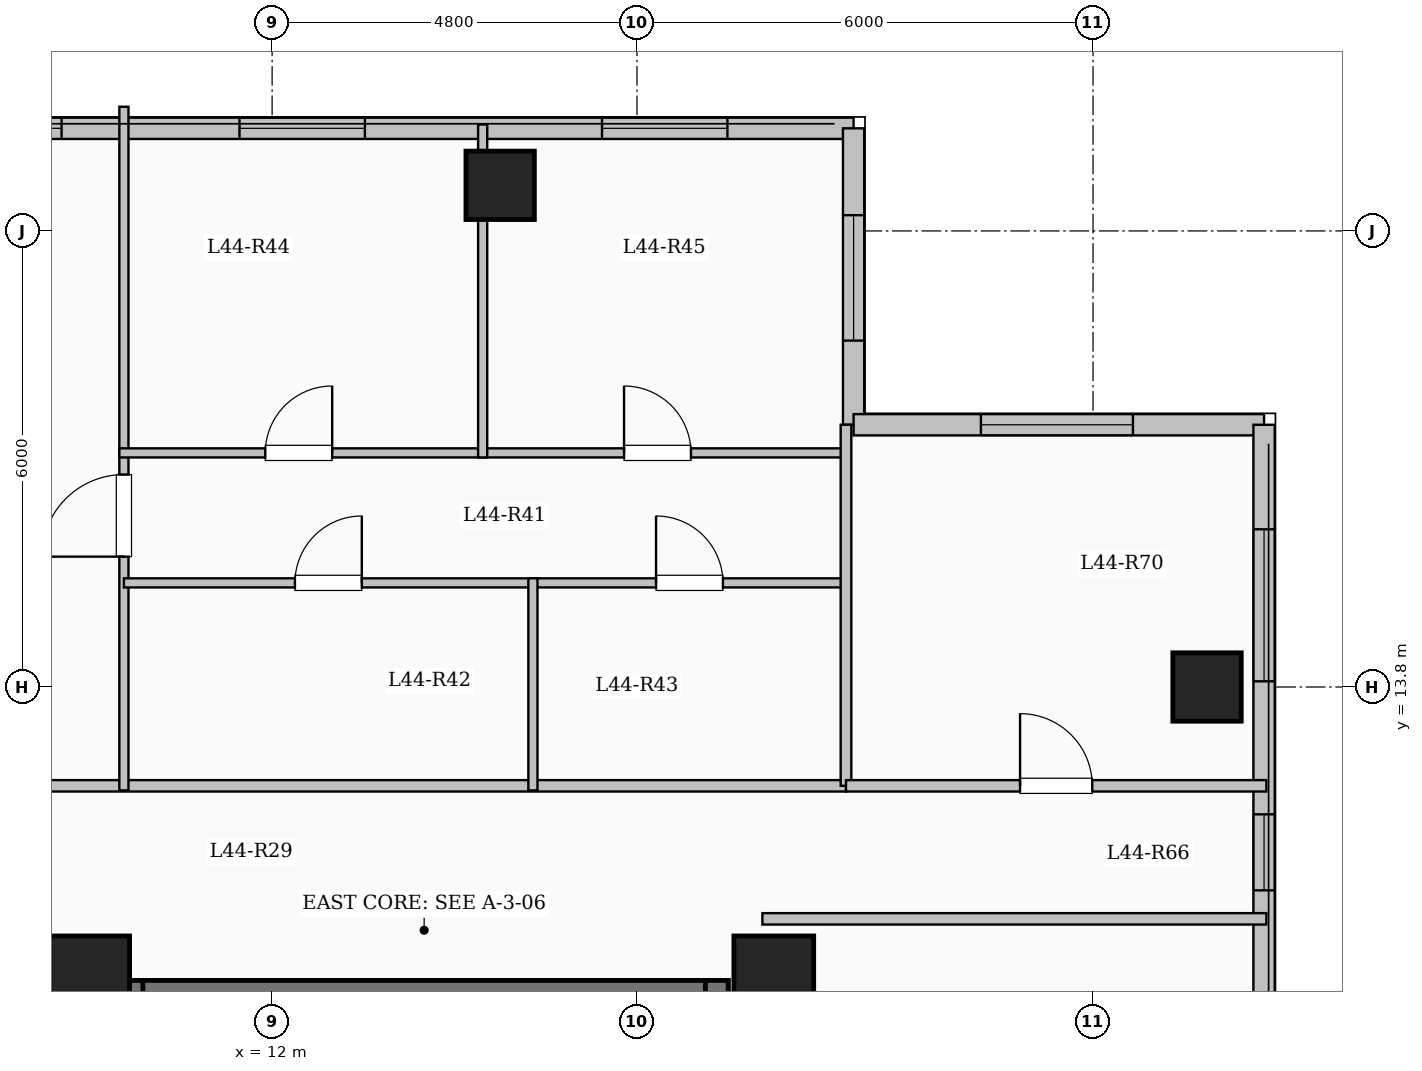
"""IFC4 building model, lengths in metres.
Left out: names, types, materials, properties, quantities, classifications, styles, units other than length and angle.
Written with IfcOpenShell. Run it as: python <this file> out.ifc"""

import sys

from ifc_helpers import new_model, si_unit, direction, frame, frame_2d, origin, origin_2d, place, context, subcontext, project, spatial, rectangle, extrude, element, fill, save


model = new_model("IFC4")
c1 = context("Model", 3, precision=1e-05, world=origin(), true_north=direction((0.0, 1.0)))
c2 = subcontext(c1, "Body", "Model", "MODEL_VIEW")
j1 = project(units=[si_unit("LENGTHUNIT", "METRE"), si_unit("PLANEANGLEUNIT", "RADIAN")], contexts=[c1])
p1 = place(None, origin())
s1 = spatial("IfcSite", under=j1, at=p1, CompositionType="ELEMENT")
p2 = place(p1, origin())
s2 = spatial("IfcBuilding", under=s1, at=p2, CompositionType="ELEMENT")
p3 = place(p2, frame((0.0, 0.0, 162.75)))
s3 = spatial("IfcBuildingStorey", under=s2, at=p3, CompositionType="ELEMENT", Elevation=162.75)
for number, where, z_axis, x_axis in (
    (1, (9.6, 10.0, 0.0), (0.0, 0.0, 1.0), (1.0, 0.0, 0.0)),
    (2, (18.6, 10.0, 0.0), (0.0, 0.0, 1.0), (1.0, 0.0, 0.0)),
):
    element("IfcColumn", number, at=place(p3, frame(where, z_axis=z_axis, x_axis=x_axis)), inside=s3, PredefinedType="COLUMN", context=c2, shape_type="SweptSolid", body=[
        extrude(rectangle(XDim=1.05, YDim=1.05, at=origin_2d()), origin(), (0.0, 0.0, 1.0), 3.35),
    ])
for number, where, z_axis, x_axis in (
    (3, (15.0, 20.4, 0.0), (0.0, 0.0, 1.0), (1.0, 0.0, 0.0)),
    (4, (24.3, 13.8, 0.0), (0.0, 0.0, 1.0), (1.0, 0.0, 0.0)),
):
    element("IfcColumn", number, at=place(p3, frame(where, z_axis=z_axis, x_axis=x_axis)), inside=s3, PredefinedType="COLUMN", context=c2, shape_type="SweptSolid", body=[
        extrude(rectangle(XDim=0.9, YDim=0.9, at=origin_2d()), origin(), (0.0, 0.0, 1.0), 3.35),
    ])
p4 = place(p3, frame((7.35, 21.15, 0.0), z_axis=(0.0, 0.0, 1.0), x_axis=(1.0, 0.0, 0.0)))
e5 = element("IfcWall", 5, at=p4, inside=s3, PredefinedType="SOLIDWALL", context=c2, shape_type="SweptSolid", body=[
    extrude(rectangle(XDim=12.3, YDim=0.28, at=frame_2d((6.15, 0.0))), origin(), (0.0, 0.0, 1.0), 3.1),
])
p5 = place(p4, frame((0.68, 0.0, 0.95)))
e6 = element("IfcOpeningElement", 6, at=p5, cuts=e5, PredefinedType="OPENING", context=c2, shape_type="SweptSolid", body=[
    extrude(rectangle(XDim=1.2, YDim=1.5, at=frame_2d((0.6, 0.75))), frame((0.0, 0.15, 0.0), z_axis=(0.0, -1.0, 0.0), x_axis=(1.0, 0.0, 0.0)), (0.0, 0.0, 1.0), 0.3),
])
p6 = place(p4, frame((4.22, 0.0, 0.9)))
e7 = element("IfcOpeningElement", 7, at=p6, cuts=e5, PredefinedType="OPENING", context=c2, shape_type="SweptSolid", body=[
    extrude(rectangle(XDim=1.65, YDim=1.6, at=frame_2d((0.825, 0.8))), frame((0.0, 0.15, 0.0), z_axis=(0.0, -1.0, 0.0), x_axis=(1.0, 0.0, 0.0)), (0.0, 0.0, 1.0), 0.3),
])
p7 = place(p4, frame((8.99, 0.0, 0.9)))
e8 = element("IfcOpeningElement", 8, at=p7, cuts=e5, PredefinedType="OPENING", context=c2, shape_type="SweptSolid", body=[
    extrude(rectangle(XDim=1.65, YDim=1.6, at=frame_2d((0.825, 0.8))), frame((0.0, 0.15, 0.0), z_axis=(0.0, -1.0, 0.0), x_axis=(1.0, 0.0, 0.0)), (0.0, 0.0, 1.0), 0.3),
])
p8 = place(p3, frame((19.65, 21.15, 0.0), z_axis=(0.0, 0.0, 1.0), x_axis=(0.0, -1.0, 0.0)))
e9 = element("IfcWall", 9, at=p8, inside=s3, PredefinedType="SOLIDWALL", context=c2, shape_type="SweptSolid", body=[
    extrude(rectangle(XDim=3.9, YDim=0.28, at=frame_2d((1.95, 0.0))), origin(), (0.0, 0.0, 1.0), 3.1),
])
p9 = place(p8, frame((1.143, 0.0, 0.9)))
e10 = element("IfcOpeningElement", 10, at=p9, cuts=e9, PredefinedType="OPENING", context=c2, shape_type="SweptSolid", body=[
    extrude(rectangle(XDim=1.65, YDim=1.6, at=frame_2d((0.825, 0.8))), frame((0.0, 0.15, 0.0), z_axis=(0.0, -1.0, 0.0), x_axis=(1.0, 0.0, 0.0)), (0.0, 0.0, 1.0), 0.3),
])
p10 = place(p3, frame((19.65, 17.25, 0.0), z_axis=(0.0, 0.0, 1.0), x_axis=(1.0, 0.0, 0.0)))
e11 = element("IfcWall", 11, at=p10, inside=s3, PredefinedType="SOLIDWALL", context=c2, shape_type="SweptSolid", body=[
    extrude(rectangle(XDim=5.4, YDim=0.28, at=frame_2d((2.7, 0.0))), origin(), (0.0, 0.0, 1.0), 3.1),
])
p11 = place(p10, frame((1.675, 0.0, 0.9)))
e12 = element("IfcOpeningElement", 12, at=p11, cuts=e11, PredefinedType="OPENING", context=c2, shape_type="SweptSolid", body=[
    extrude(rectangle(XDim=2.0, YDim=1.7, at=frame_2d((1.0, 0.85))), frame((0.0, 0.15, 0.0), z_axis=(0.0, -1.0, 0.0), x_axis=(1.0, 0.0, 0.0)), (0.0, 0.0, 1.0), 0.3),
])
p12 = place(p3, frame((25.05, 17.25, 0.0), z_axis=(0.0, 0.0, 1.0), x_axis=(0.0, -1.0, 0.0)))
e13 = element("IfcWall", 13, at=p12, inside=s3, PredefinedType="SOLIDWALL", context=c2, shape_type="SweptSolid", body=[
    extrude(rectangle(XDim=34.5, YDim=0.28, at=frame_2d((17.25, 0.0))), origin(), (0.0, 0.0, 1.0), 3.1),
])
p13 = place(p12, frame((1.375, 0.0, 0.9)))
e14 = element("IfcOpeningElement", 14, at=p13, cuts=e13, PredefinedType="OPENING", context=c2, shape_type="SweptSolid", body=[
    extrude(rectangle(XDim=2.0, YDim=1.7, at=frame_2d((1.0, 0.85))), frame((0.0, 0.15, 0.0), z_axis=(0.0, -1.0, 0.0), x_axis=(1.0, 0.0, 0.0)), (0.0, 0.0, 1.0), 0.3),
])
p14 = place(p12, frame((5.125, 0.0, 0.95)))
e15 = element("IfcOpeningElement", 15, at=p14, cuts=e13, PredefinedType="OPENING", context=c2, shape_type="SweptSolid", body=[
    extrude(rectangle(XDim=1.0, YDim=1.5, at=frame_2d((0.5, 0.75))), frame((0.0, 0.15, 0.0), z_axis=(0.0, -1.0, 0.0), x_axis=(1.0, 0.0, 0.0)), (0.0, 0.0, 1.0), 0.3),
])
p15 = place(p12, frame((14.5, 0.0, 0.9)))
e16 = element("IfcOpeningElement", 16, at=p15, cuts=e13, PredefinedType="OPENING", context=c2, shape_type="SweptSolid", body=[
    extrude(rectangle(XDim=2.0, YDim=1.7, at=frame_2d((1.0, 0.85))), frame((0.0, 0.15, 0.0), z_axis=(0.0, -1.0, 0.0), x_axis=(1.0, 0.0, 0.0)), (0.0, 0.0, 1.0), 0.3),
])
p16 = place(p12, frame((25.258, 0.0, 0.9)))
e17 = element("IfcOpeningElement", 17, at=p16, cuts=e13, PredefinedType="OPENING", context=c2, shape_type="SweptSolid", body=[
    extrude(rectangle(XDim=1.5, YDim=1.65, at=frame_2d((0.75, 0.825))), frame((0.0, 0.15, 0.0), z_axis=(0.0, -1.0, 0.0), x_axis=(1.0, 0.0, 0.0)), (0.0, 0.0, 1.0), 0.3),
])
p17 = place(p12, frame((29.95, 0.0, 0.9)))
e18 = element("IfcOpeningElement", 18, at=p17, cuts=e13, PredefinedType="OPENING", context=c2, shape_type="SweptSolid", body=[
    extrude(rectangle(XDim=2.2, YDim=1.75, at=frame_2d((1.1, 0.875))), frame((0.0, 0.15, 0.0), z_axis=(0.0, -1.0, 0.0), x_axis=(1.0, 0.0, 0.0)), (0.0, 0.0, 1.0), 0.3),
])
p18 = place(p3, frame((10.0, 9.79, 0.0), z_axis=(0.0, 0.0, 1.0), x_axis=(1.0, 0.0, 0.0)))
e19 = element("IfcWall", 19, at=p18, inside=s3, PredefinedType="SHEAR", context=c2, shape_type="SweptSolid", body=[
    extrude(rectangle(XDim=8.0, YDim=0.3, at=frame_2d((4.0, 0.0))), origin(), (0.0, 0.0, 1.0), 3.35),
])
for number, where, z_axis, x_axis in (
    (20, (10.15, 6.35, 0.0), (0.0, 0.0, 1.0), (0.0, 1.0, 0.0)),
    (21, (17.85, 6.35, 0.0), (0.0, 0.0, 1.0), (0.0, 1.0, 0.0)),
):
    element("IfcWall", number, at=place(p3, frame(where, z_axis=z_axis, x_axis=x_axis)), inside=s3, PredefinedType="SHEAR", context=c2, shape_type="SweptSolid", body=[
        extrude(rectangle(XDim=3.59, YDim=0.3, at=frame_2d((1.795, 0.0))), origin(), (0.0, 0.0, 1.0), 3.35),
    ])
p19 = place(p3, frame((3.85, 12.5, 0.0), z_axis=(0.0, 0.0, 1.0), x_axis=(1.0, 0.0, 0.0)))
e22 = element("IfcWall", 22, at=p19, inside=s3, PredefinedType="PARTITIONING", context=c2, shape_type="SweptSolid", body=[
    extrude(rectangle(XDim=15.7, YDim=0.15, at=frame_2d((7.85, 0.0))), origin(), (0.0, 0.0, 1.0), 3.1),
])
p20 = place(p19, frame((0.7, 0.0, 0.0)))
e23 = element("IfcOpeningElement", 23, at=p20, cuts=e22, PredefinedType="OPENING", context=c2, shape_type="SweptSolid", body=[
    extrude(rectangle(XDim=0.96, YDim=2.15, at=frame_2d((0.48, 1.075))), frame((0.0, 0.085, 0.0), z_axis=(0.0, -1.0, 0.0), x_axis=(1.0, 0.0, 0.0)), (0.0, 0.0, 1.0), 0.17),
])
p21 = place(p3, frame((10.05, 12.44, 0.0), z_axis=(0.0, 0.0, 1.0), x_axis=(0.0, 1.0, 0.0)))
e24 = element("IfcWall", 24, at=p21, inside=s3, PredefinedType="PARTITIONING", context=c2, shape_type="SweptSolid", body=[
    extrude(rectangle(XDim=8.994, YDim=0.12, at=frame_2d((4.497, 0.0))), origin(), (0.0, 0.0, 1.0), 3.1),
])
p22 = place(p21, frame((3.075, 0.0, 0.0)))
e25 = element("IfcOpeningElement", 25, at=p22, cuts=e24, PredefinedType="OPENING", context=c2, shape_type="SweptSolid", body=[
    extrude(rectangle(XDim=1.08, YDim=2.15, at=frame_2d((0.54, 1.075))), frame((0.0, 0.07, 0.0), z_axis=(0.0, -1.0, 0.0), x_axis=(1.0, 0.0, 0.0)), (0.0, 0.0, 1.0), 0.14),
])
p23 = place(p3, frame((10.05, 15.17, 0.0), z_axis=(0.0, 0.0, 1.0), x_axis=(1.0, 0.0, 0.0)))
e26 = element("IfcWall", 26, at=p23, inside=s3, PredefinedType="PARTITIONING", context=c2, shape_type="SweptSolid", body=[
    extrude(rectangle(XDim=5.381, YDim=0.12, at=frame_2d((2.69, 0.0))), origin(), (0.0, 0.0, 1.0), 3.1),
])
p24 = place(p23, frame((2.25, 0.0, 0.0)))
e27 = element("IfcOpeningElement", 27, at=p24, cuts=e26, PredefinedType="OPENING", context=c2, shape_type="SweptSolid", body=[
    extrude(rectangle(XDim=0.88, YDim=2.1, at=frame_2d((0.44, 1.05))), frame((0.0, 0.07, 0.0), z_axis=(0.0, -1.0, 0.0), x_axis=(1.0, 0.0, 0.0)), (0.0, 0.0, 1.0), 0.14),
])
p25 = place(p3, frame((15.431, 15.17, 0.0), z_axis=(0.0, 0.0, 1.0), x_axis=(1.0, 0.0, 0.0)))
e28 = element("IfcWall", 28, at=p25, inside=s3, PredefinedType="PARTITIONING", context=c2, shape_type="SweptSolid", body=[
    extrude(rectangle(XDim=4.119, YDim=0.12, at=frame_2d((2.06, 0.0))), origin(), (0.0, 0.0, 1.0), 3.1),
])
p26 = place(p25, frame((1.62, 0.0, 0.0)))
e29 = element("IfcOpeningElement", 29, at=p26, cuts=e28, PredefinedType="OPENING", context=c2, shape_type="SweptSolid", body=[
    extrude(rectangle(XDim=0.88, YDim=2.1, at=frame_2d((0.44, 1.05))), frame((0.0, 0.07, 0.0), z_axis=(0.0, -1.0, 0.0), x_axis=(1.0, 0.0, 0.0)), (0.0, 0.0, 1.0), 0.14),
])
p27 = place(p3, frame((9.99, 16.88, 0.0), z_axis=(0.0, 0.0, 1.0), x_axis=(1.0, 0.0, 0.0)))
e30 = element("IfcWall", 30, at=p27, inside=s3, PredefinedType="PARTITIONING", context=c2, shape_type="SweptSolid", body=[
    extrude(rectangle(XDim=9.62, YDim=0.12, at=frame_2d((4.81, 0.0))), origin(), (0.0, 0.0, 1.0), 2.685),
])
p28 = place(p27, frame((1.92, 0.0, 0.0)))
e31 = element("IfcOpeningElement", 31, at=p28, cuts=e30, PredefinedType="OPENING", context=c2, shape_type="SweptSolid", body=[
    extrude(rectangle(XDim=0.88, YDim=2.1, at=frame_2d((0.44, 1.05))), frame((0.0, 0.07, 0.0), z_axis=(0.0, -1.0, 0.0), x_axis=(1.0, 0.0, 0.0)), (0.0, 0.0, 1.0), 0.14),
])
p29 = place(p27, frame((6.64, 0.0, 0.0)))
e32 = element("IfcOpeningElement", 32, at=p29, cuts=e30, PredefinedType="OPENING", context=c2, shape_type="SweptSolid", body=[
    extrude(rectangle(XDim=0.88, YDim=2.1, at=frame_2d((0.44, 1.05))), frame((0.0, 0.07, 0.0), z_axis=(0.0, -1.0, 0.0), x_axis=(1.0, 0.0, 0.0)), (0.0, 0.0, 1.0), 0.14),
])
p30 = place(p3, frame((15.431, 12.44, 0.0), z_axis=(0.0, 0.0, 1.0), x_axis=(0.0, 1.0, 0.0)))
e33 = element("IfcWall", 33, at=p30, inside=s3, PredefinedType="PARTITIONING", context=c2, shape_type="SweptSolid", body=[
    extrude(rectangle(XDim=2.79, YDim=0.12, at=frame_2d((1.395, 0.0))), origin(), (0.0, 0.0, 1.0), 3.1),
])
p31 = place(p3, frame((14.77, 16.82, 0.0), z_axis=(0.0, 0.0, 1.0), x_axis=(0.0, 1.0, 0.0)))
e34 = element("IfcWall", 34, at=p31, inside=s3, PredefinedType="PARTITIONING", context=c2, shape_type="SweptSolid", body=[
    extrude(rectangle(XDim=4.38, YDim=0.12, at=frame_2d((2.19, 0.0))), origin(), (0.0, 0.0, 1.0), 2.585),
])
p32 = place(p3, frame((18.45, 10.75, 0.0), z_axis=(0.0, 0.0, 1.0), x_axis=(1.0, 0.0, 0.0)))
e35 = element("IfcWall", 35, at=p32, inside=s3, PredefinedType="PARTITIONING", context=c2, shape_type="SweptSolid", body=[
    extrude(rectangle(XDim=6.63, YDim=0.15, at=frame_2d((3.315, 0.0))), origin(), (0.0, 0.0, 1.0), 3.1),
])
p33 = place(p3, frame((19.55, 12.5, 0.0), z_axis=(0.0, 0.0, 1.0), x_axis=(0.0, 1.0, 0.0)))
e36 = element("IfcWall", 36, at=p33, inside=s3, PredefinedType="PARTITIONING", context=c2, shape_type="SweptSolid", body=[
    extrude(rectangle(XDim=4.75, YDim=0.14, at=frame_2d((2.375, 0.0))), origin(), (0.0, 0.0, 1.0), 3.1),
])
p34 = place(p3, frame((19.55, 12.5, 0.0), z_axis=(0.0, 0.0, 1.0), x_axis=(1.0, 0.0, 0.0)))
e37 = element("IfcWall", 37, at=p34, inside=s3, PredefinedType="PARTITIONING", context=c2, shape_type="SweptSolid", body=[
    extrude(rectangle(XDim=5.53, YDim=0.15, at=frame_2d((2.765, 0.0))), origin(), (0.0, 0.0, 1.0), 3.1),
])
p35 = place(p34, frame((2.29, 0.0, 0.0)))
e38 = element("IfcOpeningElement", 38, at=p35, cuts=e37, PredefinedType="OPENING", context=c2, shape_type="SweptSolid", body=[
    extrude(rectangle(XDim=0.95, YDim=2.15, at=frame_2d((0.475, 1.075))), frame((0.0, 0.085, 0.0), z_axis=(0.0, -1.0, 0.0), x_axis=(1.0, 0.0, 0.0)), (0.0, 0.0, 1.0), 0.17),
])
p36 = place(p5, origin())
e39 = element("IfcWindow", 39, at=p36, inside=s3, PartitioningType="SINGLE_PANEL", PredefinedType="WINDOW", context=c2, shape_type="SweptSolid", body=[
    extrude(rectangle(XDim=1.2, YDim=1.5, at=frame_2d((0.6, 0.75))), frame((0.0, 0.03, 0.0), z_axis=(0.0, -1.0, 0.0), x_axis=(1.0, 0.0, 0.0)), (0.0, 0.0, 1.0), 0.06),
])
fill(e6, e39)
p37 = place(p6, origin())
e40 = element("IfcWindow", 40, at=p37, inside=s3, PartitioningType="SINGLE_PANEL", PredefinedType="WINDOW", context=c2, shape_type="SweptSolid", body=[
    extrude(rectangle(XDim=1.65, YDim=1.6, at=frame_2d((0.825, 0.8))), frame((0.0, 0.03, 0.0), z_axis=(0.0, -1.0, 0.0), x_axis=(1.0, 0.0, 0.0)), (0.0, 0.0, 1.0), 0.06),
])
fill(e7, e40)
p38 = place(p7, origin())
e41 = element("IfcWindow", 41, at=p38, inside=s3, PartitioningType="SINGLE_PANEL", PredefinedType="WINDOW", context=c2, shape_type="SweptSolid", body=[
    extrude(rectangle(XDim=1.65, YDim=1.6, at=frame_2d((0.825, 0.8))), frame((0.0, 0.03, 0.0), z_axis=(0.0, -1.0, 0.0), x_axis=(1.0, 0.0, 0.0)), (0.0, 0.0, 1.0), 0.06),
])
fill(e8, e41)
p39 = place(p9, origin())
e42 = element("IfcWindow", 42, at=p39, inside=s3, PartitioningType="SINGLE_PANEL", PredefinedType="WINDOW", context=c2, shape_type="SweptSolid", body=[
    extrude(rectangle(XDim=1.65, YDim=1.6, at=frame_2d((0.825, 0.8))), frame((0.0, 0.03, 0.0), z_axis=(0.0, -1.0, 0.0), x_axis=(1.0, 0.0, 0.0)), (0.0, 0.0, 1.0), 0.06),
])
fill(e10, e42)
p40 = place(p11, origin())
e43 = element("IfcWindow", 43, at=p40, inside=s3, PartitioningType="SINGLE_PANEL", PredefinedType="WINDOW", context=c2, shape_type="SweptSolid", body=[
    extrude(rectangle(XDim=2.0, YDim=1.7, at=frame_2d((1.0, 0.85))), frame((0.0, 0.03, 0.0), z_axis=(0.0, -1.0, 0.0), x_axis=(1.0, 0.0, 0.0)), (0.0, 0.0, 1.0), 0.06),
])
fill(e12, e43)
p41 = place(p13, origin())
e44 = element("IfcWindow", 44, at=p41, inside=s3, PartitioningType="SINGLE_PANEL", PredefinedType="WINDOW", context=c2, shape_type="SweptSolid", body=[
    extrude(rectangle(XDim=2.0, YDim=1.7, at=frame_2d((1.0, 0.85))), frame((0.0, 0.03, 0.0), z_axis=(0.0, -1.0, 0.0), x_axis=(1.0, 0.0, 0.0)), (0.0, 0.0, 1.0), 0.06),
])
fill(e14, e44)
p42 = place(p14, origin())
e45 = element("IfcWindow", 45, at=p42, inside=s3, PartitioningType="SINGLE_PANEL", PredefinedType="WINDOW", context=c2, shape_type="SweptSolid", body=[
    extrude(rectangle(XDim=1.0, YDim=1.5, at=frame_2d((0.5, 0.75))), frame((0.0, 0.03, 0.0), z_axis=(0.0, -1.0, 0.0), x_axis=(1.0, 0.0, 0.0)), (0.0, 0.0, 1.0), 0.06),
])
fill(e15, e45)
p43 = place(p22, origin())
e46 = element("IfcDoor", 46, at=p43, inside=s3, OperationType="SINGLE_SWING_LEFT", PredefinedType="DOOR", context=c2, shape_type="SweptSolid", body=[
    extrude(rectangle(XDim=1.08, YDim=2.15, at=frame_2d((0.54, 1.075))), frame((0.0, 0.025, 0.0), z_axis=(0.0, -1.0, 0.0), x_axis=(1.0, 0.0, 0.0)), (0.0, 0.0, 1.0), 0.05),
])
fill(e25, e46)
p44 = place(p24, origin())
e47 = element("IfcDoor", 47, at=p44, inside=s3, OperationType="SINGLE_SWING_RIGHT", PredefinedType="DOOR", context=c2, shape_type="SweptSolid", body=[
    extrude(rectangle(XDim=0.88, YDim=2.1, at=frame_2d((0.44, 1.05))), frame((0.0, 0.025, 0.0), z_axis=(0.0, -1.0, 0.0), x_axis=(1.0, 0.0, 0.0)), (0.0, 0.0, 1.0), 0.05),
])
fill(e27, e47)
p45 = place(p26, origin())
e48 = element("IfcDoor", 48, at=p45, inside=s3, OperationType="SINGLE_SWING_LEFT", PredefinedType="DOOR", context=c2, shape_type="SweptSolid", body=[
    extrude(rectangle(XDim=0.88, YDim=2.1, at=frame_2d((0.44, 1.05))), frame((0.0, 0.025, 0.0), z_axis=(0.0, -1.0, 0.0), x_axis=(1.0, 0.0, 0.0)), (0.0, 0.0, 1.0), 0.05),
])
fill(e29, e48)
p46 = place(p28, origin())
e49 = element("IfcDoor", 49, at=p46, inside=s3, OperationType="SINGLE_SWING_RIGHT", PredefinedType="DOOR", context=c2, shape_type="SweptSolid", body=[
    extrude(rectangle(XDim=0.88, YDim=2.1, at=frame_2d((0.44, 1.05))), frame((0.0, 0.025, 0.0), z_axis=(0.0, -1.0, 0.0), x_axis=(1.0, 0.0, 0.0)), (0.0, 0.0, 1.0), 0.05),
])
fill(e31, e49)
p47 = place(p29, origin())
e50 = element("IfcDoor", 50, at=p47, inside=s3, OperationType="SINGLE_SWING_LEFT", PredefinedType="DOOR", context=c2, shape_type="SweptSolid", body=[
    extrude(rectangle(XDim=0.88, YDim=2.1, at=frame_2d((0.44, 1.05))), frame((0.0, 0.025, 0.0), z_axis=(0.0, -1.0, 0.0), x_axis=(1.0, 0.0, 0.0)), (0.0, 0.0, 1.0), 0.05),
])
fill(e32, e50)
p48 = place(p35, origin())
e51 = element("IfcDoor", 51, at=p48, inside=s3, OperationType="SINGLE_SWING_LEFT", PredefinedType="DOOR", context=c2, shape_type="SweptSolid", body=[
    extrude(rectangle(XDim=0.95, YDim=2.15, at=frame_2d((0.475, 1.075))), frame((0.0, 0.025, 0.0), z_axis=(0.0, -1.0, 0.0), x_axis=(1.0, 0.0, 0.0)), (0.0, 0.0, 1.0), 0.05),
])
fill(e38, e51)
save(model, sys.argv[1])
